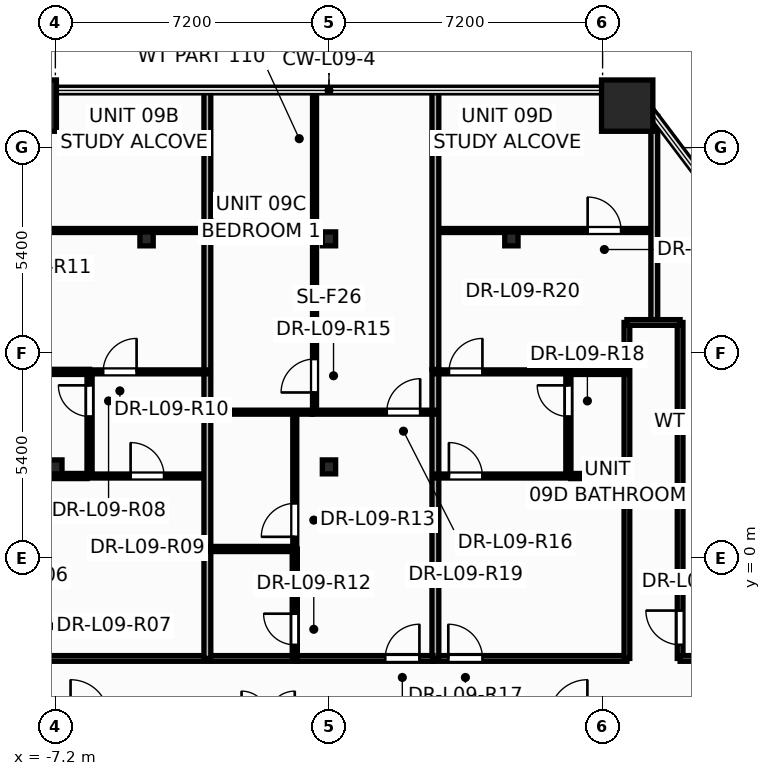
"""IFC4 building model, lengths in metres.
Left out: names, types, materials, properties, quantities, classifications, styles, units other than length and angle.
Written with IfcOpenShell. Run it as: python <this file> out.ifc"""

import sys

from ifc_helpers import new_model, si_unit, direction, frame, frame_2d, origin, origin_2d, place, context, subcontext, project, spatial, rectangle, hollow_rectangle, i_section, extrude, element, fill, save


model = new_model("IFC4")
c1 = context("Model", 3, precision=1e-05, world=origin(), true_north=direction((0.0, 1.0)))
c2 = subcontext(c1, "Body", "Model", "MODEL_VIEW")
j1 = project(units=[si_unit("LENGTHUNIT", "METRE"), si_unit("PLANEANGLEUNIT", "RADIAN")], contexts=[c1])
p1 = place(None, origin())
s1 = spatial("IfcSite", under=j1, at=p1, CompositionType="ELEMENT")
p2 = place(p1, origin())
s2 = spatial("IfcBuilding", under=s1, at=p2, CompositionType="ELEMENT")
p3 = place(p2, frame((0.0, 0.0, 38.7)))
s3 = spatial("IfcBuildingStorey", under=s2, at=p3, CompositionType="ELEMENT", Elevation=38.7)
for number, where, z_axis, x_axis in (
    (1, (7.847, 11.906, 0.0), (0.0, 0.0, 1.0), (1.0, 0.0, 0.0)),
    (2, (-7.847, 11.906, 0.0), (0.0, 0.0, 1.0), (1.0, 0.0, 0.0)),
):
    element("IfcColumn", number, at=place(p3, frame(where, z_axis=z_axis, x_axis=x_axis)), inside=s3, PredefinedType="COLUMN", context=c2, shape_type="SweptSolid", body=[
        extrude(hollow_rectangle(XDim=1.35, YDim=1.35, WallThickness=0.065, at=origin_2d()), origin(), (0.0, 0.0, 1.0), 3.6),
    ])
for number, where, z_axis, x_axis in (
    (3, (-7.2, 2.4, 0.0), (0.0, 0.0, 1.0), (1.0, 0.0, 0.0)),
    (4, (0.0, 2.4, 0.0), (0.0, 0.0, 1.0), (1.0, 0.0, 0.0)),
    (5, (7.2, 2.4, 0.0), (0.0, 0.0, 1.0), (1.0, 0.0, 0.0)),
    (6, (-4.8, 8.4, 0.0), (0.0, 0.0, 1.0), (1.0, 0.0, 0.0)),
    (7, (0.0, 8.4, 0.0), (0.0, 0.0, 1.0), (1.0, 0.0, 0.0)),
    (8, (4.8, 8.4, 0.0), (0.0, 0.0, 1.0), (1.0, 0.0, 0.0)),
):
    element("IfcColumn", number, at=place(p3, frame(where, z_axis=z_axis, x_axis=x_axis)), inside=s3, PredefinedType="COLUMN", context=c2, shape_type="SweptSolid", body=[
        extrude(i_section(OverallWidth=0.35, OverallDepth=0.367, WebThickness=0.025, FlangeThickness=0.032, at=origin_2d()), origin(), (0.0, 0.0, 1.0), 3.6),
    ])
p4 = place(p3, frame((9.24, -2.64, 0.0), z_axis=(0.0, 0.0, 1.0), x_axis=(0.0, 1.0, 0.0)))
e9 = element("IfcWall", 9, at=p4, inside=s3, PredefinedType="PARTITIONING", context=c2, shape_type="SweptSolid", body=[
    extrude(rectangle(XDim=8.84, YDim=0.15, at=frame_2d((4.42, 0.0))), origin(), (0.0, 0.0, 1.0), 2.509),
])
p5 = place(p4, frame((0.359, 0.0, 0.0)))
e10 = element("IfcOpeningElement", 10, at=p5, cuts=e9, PredefinedType="OPENING", context=c2, shape_type="SweptSolid", body=[
    extrude(rectangle(XDim=0.906, YDim=2.104, at=frame_2d((0.45, 1.052))), frame((0.0, 0.085, 0.0), z_axis=(0.0, -1.0, 0.0), x_axis=(1.0, 0.0, 0.0)), (0.0, 0.0, 1.0), 0.17),
])
p6 = place(p3, frame((-0.38, 3.84, 0.0), z_axis=(0.0, 0.0, 1.0), x_axis=(0.0, 1.0, 0.0)))
e11 = element("IfcWall", 11, at=p6, inside=s3, PredefinedType="PARTITIONING", context=c2, shape_type="SweptSolid", body=[
    extrude(rectangle(XDim=8.466, YDim=0.105, at=frame_2d((4.233, 0.0))), origin(), (0.0, 0.0, 1.0), 2.509),
])
p7 = place(p6, frame((0.518, 0.0, 0.0)))
e12 = element("IfcOpeningElement", 12, at=p7, cuts=e11, PredefinedType="OPENING", context=c2, shape_type="SweptSolid", body=[
    extrude(rectangle(XDim=0.886, YDim=2.104, at=frame_2d((0.44, 1.052))), frame((0.0, 0.062, 0.0), z_axis=(0.0, -1.0, 0.0), x_axis=(1.0, 0.0, 0.0)), (0.0, 0.0, 1.0), 0.125),
])
p8 = place(p3, frame((2.8, 8.62, 0.0), z_axis=(0.0, 0.0, 1.0), x_axis=(1.0, 0.0, 0.0)))
e13 = element("IfcWall", 13, at=p8, inside=s3, PredefinedType="PARTITIONING", context=c2, shape_type="SweptSolid", body=[
    extrude(rectangle(XDim=5.76, YDim=0.105, at=frame_2d((2.88, 0.0))), origin(), (0.0, 0.0, 1.0), 2.509),
])
p9 = place(p8, frame((4.007, 0.0, 0.0)))
e14 = element("IfcOpeningElement", 14, at=p9, cuts=e13, PredefinedType="OPENING", context=c2, shape_type="SweptSolid", body=[
    extrude(rectangle(XDim=0.886, YDim=2.104, at=frame_2d((0.44, 1.052))), frame((0.0, 0.062, 0.0), z_axis=(0.0, -1.0, 0.0), x_axis=(1.0, 0.0, 0.0)), (0.0, 0.0, 1.0), 0.125),
])
p10 = place(p3, frame((9.24, -2.64, 0.0), z_axis=(0.0, 0.0, 1.0), x_axis=(1.0, 0.0, 0.0)))
e15 = element("IfcWall", 15, at=p10, inside=s3, PredefinedType="PARTITIONING", context=c2, shape_type="SweptSolid", body=[
    extrude(rectangle(XDim=5.4, YDim=0.15, at=frame_2d((2.7, 0.0))), origin(), (0.0, 0.0, 1.0), 3.35),
])
p11 = place(p3, frame((-8.56, 8.62, 0.0), z_axis=(0.0, 0.0, 1.0), x_axis=(1.0, 0.0, 0.0)))
e16 = element("IfcWall", 16, at=p11, inside=s3, PredefinedType="PARTITIONING", context=c2, shape_type="SweptSolid", body=[
    extrude(rectangle(XDim=5.36, YDim=0.105, at=frame_2d((2.68, 0.0))), origin(), (0.0, 0.0, 1.0), 2.509),
])
p12 = place(p11, frame((0.358, 0.0, 0.0)))
e17 = element("IfcOpeningElement", 17, at=p12, cuts=e16, PredefinedType="OPENING", context=c2, shape_type="SweptSolid", body=[
    extrude(rectangle(XDim=0.886, YDim=2.104, at=frame_2d((0.44, 1.052))), frame((0.0, 0.062, 0.0), z_axis=(0.0, -1.0, 0.0), x_axis=(1.0, 0.0, 0.0)), (0.0, 0.0, 1.0), 0.125),
])
p13 = place(p3, frame((2.74, -2.64, 0.0), z_axis=(0.0, 0.0, 1.0), x_axis=(1.0, 0.0, 0.0)))
e18 = element("IfcWall", 18, at=p13, inside=s3, PredefinedType="PARTITIONING", context=c2, shape_type="SweptSolid", body=[
    extrude(rectangle(XDim=5.1, YDim=0.15, at=frame_2d((2.55, 0.0))), origin(), (0.0, 0.0, 1.0), 2.325),
])
p14 = place(p13, frame((0.4, 0.0, 0.0)))
e19 = element("IfcOpeningElement", 19, at=p14, cuts=e18, PredefinedType="OPENING", context=c2, shape_type="SweptSolid", body=[
    extrude(rectangle(XDim=0.906, YDim=2.104, at=frame_2d((0.45, 1.052))), frame((0.0, 0.085, 0.0), z_axis=(0.0, -1.0, 0.0), x_axis=(1.0, 0.0, 0.0)), (0.0, 0.0, 1.0), 0.17),
])
p15 = place(p3, frame((7.84, -2.64, 0.0), z_axis=(0.0, 0.0, 1.0), x_axis=(0.0, 1.0, 0.0)))
e20 = element("IfcWall", 20, at=p15, inside=s3, PredefinedType="PARTITIONING", context=c2, shape_type="SweptSolid", body=[
    extrude(rectangle(XDim=8.84, YDim=0.15, at=frame_2d((4.42, 0.0))), origin(), (0.0, 0.0, 1.0), 2.509),
])
p16 = place(p3, frame((2.8, -2.64, 0.0), z_axis=(0.0, 0.0, 1.0), x_axis=(0.0, 1.0, 0.0)))
e21 = element("IfcWall", 21, at=p16, inside=s3, PredefinedType="PARTITIONING", context=c2, shape_type="SweptSolid", body=[
    extrude(rectangle(XDim=7.6, YDim=0.18, at=frame_2d((3.8, 0.0))), origin(), (0.0, 0.0, 1.0), 2.325),
])
p17 = place(p3, frame((-7.84, -2.64, 0.0), z_axis=(0.0, 0.0, 1.0), x_axis=(1.0, 0.0, 0.0)))
e22 = element("IfcWall", 22, at=p17, inside=s3, PredefinedType="PARTITIONING", context=c2, shape_type="SweptSolid", body=[
    extrude(rectangle(XDim=7.0, YDim=0.15, at=frame_2d((3.5, 0.0))), origin(), (0.0, 0.0, 1.0), 2.325),
])
p18 = place(p3, frame((2.8, 4.962, 0.0), z_axis=(0.0, 0.0, 1.0), x_axis=(0.0, 1.0, 0.0)))
e23 = element("IfcWall", 23, at=p18, inside=s3, PredefinedType="PARTITIONING", context=c2, shape_type="SweptSolid", body=[
    extrude(rectangle(XDim=7.344, YDim=0.18, at=frame_2d((3.672, 0.0))), origin(), (0.0, 0.0, 1.0), 2.509),
])
p19 = place(p3, frame((-0.838, -2.64, 0.0), z_axis=(0.0, 0.0, 1.0), x_axis=(1.0, 0.0, 0.0)))
e24 = element("IfcWall", 24, at=p19, inside=s3, PredefinedType="PARTITIONING", context=c2, shape_type="SweptSolid", body=[
    extrude(rectangle(XDim=3.576, YDim=0.15, at=frame_2d((1.788, 0.0))), origin(), (0.0, 0.0, 1.0), 2.325),
])
p20 = place(p19, frame((2.318, 0.0, 0.0)))
e25 = element("IfcOpeningElement", 25, at=p20, cuts=e24, PredefinedType="OPENING", context=c2, shape_type="SweptSolid", body=[
    extrude(rectangle(XDim=0.906, YDim=2.104, at=frame_2d((0.45, 1.052))), frame((0.0, 0.085, 0.0), z_axis=(0.0, -1.0, 0.0), x_axis=(1.0, 0.0, 0.0)), (0.0, 0.0, 1.0), 0.17),
])
p21 = place(p3, frame((-3.2, 3.8, 0.0), z_axis=(0.0, 0.0, 1.0), x_axis=(0.0, 1.0, 0.0)))
e26 = element("IfcWall", 26, at=p21, inside=s3, PredefinedType="PARTITIONING", context=c2, shape_type="SweptSolid", body=[
    extrude(rectangle(XDim=8.506, YDim=0.18, at=frame_2d((4.253, 0.0))), origin(), (0.0, 0.0, 1.0), 2.509),
])
p22 = place(p3, frame((-0.9, 0.24, 0.0), z_axis=(0.0, 0.0, 1.0), x_axis=(0.0, 1.0, 0.0)))
e27 = element("IfcWall", 27, at=p22, inside=s3, PredefinedType="PARTITIONING", context=c2, shape_type="SweptSolid", body=[
    extrude(rectangle(XDim=3.6, YDim=0.105, at=frame_2d((1.8, 0.0))), origin(), (0.0, 0.0, 1.0), 2.325),
])
p23 = place(p22, frame((0.32, 0.0, 0.0)))
e28 = element("IfcOpeningElement", 28, at=p23, cuts=e27, PredefinedType="OPENING", context=c2, shape_type="SweptSolid", body=[
    extrude(rectangle(XDim=0.886, YDim=2.104, at=frame_2d((0.44, 1.052))), frame((0.0, 0.062, 0.0), z_axis=(0.0, -1.0, 0.0), x_axis=(1.0, 0.0, 0.0)), (0.0, 0.0, 1.0), 0.125),
])
p24 = place(p3, frame((2.8, 2.16, 0.0), z_axis=(0.0, 0.0, 1.0), x_axis=(1.0, 0.0, 0.0)))
e29 = element("IfcWall", 29, at=p24, inside=s3, PredefinedType="PARTITIONING", context=c2, shape_type="SweptSolid", body=[
    extrude(rectangle(XDim=3.56, YDim=0.105, at=frame_2d((1.78, 0.0))), origin(), (0.0, 0.0, 1.0), 2.325),
])
p25 = place(p24, frame((0.356, 0.0, 0.0)))
e30 = element("IfcOpeningElement", 30, at=p25, cuts=e29, PredefinedType="OPENING", context=c2, shape_type="SweptSolid", body=[
    extrude(rectangle(XDim=0.886, YDim=2.104, at=frame_2d((0.44, 1.052))), frame((0.0, 0.062, 0.0), z_axis=(0.0, -1.0, 0.0), x_axis=(1.0, 0.0, 0.0)), (0.0, 0.0, 1.0), 0.125),
])
p26 = place(p3, frame((2.8, 4.9, 0.0), z_axis=(0.0, 0.0, 1.0), x_axis=(1.0, 0.0, 0.0)))
e31 = element("IfcWall", 31, at=p26, inside=s3, PredefinedType="PARTITIONING", context=c2, shape_type="SweptSolid", body=[
    extrude(rectangle(XDim=3.5, YDim=0.105, at=frame_2d((1.75, 0.0))), origin(), (0.0, 0.0, 1.0), 2.509),
])
p27 = place(p26, frame((0.358, 0.0, 0.0)))
e32 = element("IfcOpeningElement", 32, at=p27, cuts=e31, PredefinedType="OPENING", context=c2, shape_type="SweptSolid", body=[
    extrude(rectangle(XDim=0.886, YDim=2.104, at=frame_2d((0.44, 1.052))), frame((0.0, 0.062, 0.0), z_axis=(0.0, -1.0, 0.0), x_axis=(1.0, 0.0, 0.0)), (0.0, 0.0, 1.0), 0.125),
])
p28 = place(p3, frame((-0.44, 3.84, 0.0), z_axis=(0.0, 0.0, 1.0), x_axis=(1.0, 0.0, 0.0)))
e33 = element("IfcWall", 33, at=p28, inside=s3, PredefinedType="PARTITIONING", context=c2, shape_type="SweptSolid", body=[
    extrude(rectangle(XDim=3.24, YDim=0.105, at=frame_2d((1.62, 0.0))), origin(), (0.0, 0.0, 1.0), 2.325),
])
p29 = place(p28, frame((1.96, 0.0, 0.0)))
e34 = element("IfcOpeningElement", 34, at=p29, cuts=e33, PredefinedType="OPENING", context=c2, shape_type="SweptSolid", body=[
    extrude(rectangle(XDim=0.886, YDim=2.104, at=frame_2d((0.44, 1.052))), frame((0.0, 0.062, 0.0), z_axis=(0.0, -1.0, 0.0), x_axis=(1.0, 0.0, 0.0)), (0.0, 0.0, 1.0), 0.125),
])
p30 = place(p3, frame((-6.36, 2.16, 0.0), z_axis=(0.0, 0.0, 1.0), x_axis=(1.0, 0.0, 0.0)))
e35 = element("IfcWall", 35, at=p30, inside=s3, PredefinedType="PARTITIONING", context=c2, shape_type="SweptSolid", body=[
    extrude(rectangle(XDim=3.16, YDim=0.105, at=frame_2d((1.58, 0.0))), origin(), (0.0, 0.0, 1.0), 2.325),
])
p31 = place(p30, frame((1.14, 0.0, 0.0)))
e36 = element("IfcOpeningElement", 36, at=p31, cuts=e35, PredefinedType="OPENING", context=c2, shape_type="SweptSolid", body=[
    extrude(rectangle(XDim=0.886, YDim=2.104, at=frame_2d((0.44, 1.052))), frame((0.0, 0.062, 0.0), z_axis=(0.0, -1.0, 0.0), x_axis=(1.0, 0.0, 0.0)), (0.0, 0.0, 1.0), 0.125),
])
p32 = place(p3, frame((-6.3, 4.9, 0.0), z_axis=(0.0, 0.0, 1.0), x_axis=(1.0, 0.0, 0.0)))
e37 = element("IfcWall", 37, at=p32, inside=s3, PredefinedType="PARTITIONING", context=c2, shape_type="SweptSolid", body=[
    extrude(rectangle(XDim=3.1, YDim=0.105, at=frame_2d((1.55, 0.0))), origin(), (0.0, 0.0, 1.0), 2.509),
])
p33 = place(p32, frame((0.358, 0.0, 0.0)))
e38 = element("IfcOpeningElement", 38, at=p33, cuts=e37, PredefinedType="OPENING", context=c2, shape_type="SweptSolid", body=[
    extrude(rectangle(XDim=0.886, YDim=2.104, at=frame_2d((0.44, 1.052))), frame((0.0, 0.062, 0.0), z_axis=(0.0, -1.0, 0.0), x_axis=(1.0, 0.0, 0.0)), (0.0, 0.0, 1.0), 0.125),
])
p34 = place(p3, frame((8.56, 6.2, 0.0), z_axis=(0.0, 0.0, 1.0), x_axis=(0.0, 1.0, 0.0)))
e39 = element("IfcWall", 39, at=p34, inside=s3, PredefinedType="PARTITIONING", context=c2, shape_type="SweptSolid", body=[
    extrude(rectangle(XDim=5.425, YDim=0.18, at=frame_2d((2.712, 0.0))), origin(), (0.0, 0.0, 1.0), 2.509),
])
p35 = place(p3, frame((-3.2, -2.64, 0.0), z_axis=(0.0, 0.0, 1.0), x_axis=(0.0, 1.0, 0.0)))
e40 = element("IfcWall", 40, at=p35, inside=s3, PredefinedType="PARTITIONING", context=c2, shape_type="SweptSolid", body=[
    extrude(rectangle(XDim=6.438, YDim=0.18, at=frame_2d((3.219, 0.0))), origin(), (0.0, 0.0, 1.0), 2.325),
])
p36 = place(p3, frame((-0.9, -2.64, 0.0), z_axis=(0.0, 0.0, 1.0), x_axis=(0.0, 1.0, 0.0)))
e41 = element("IfcWall", 41, at=p36, inside=s3, PredefinedType="PARTITIONING", context=c2, shape_type="SweptSolid", body=[
    extrude(rectangle(XDim=2.88, YDim=0.135, at=frame_2d((1.44, 0.0))), origin(), (0.0, 0.0, 1.0), 3.35),
])
p37 = place(p36, frame((0.357, 0.0, 0.0)))
e42 = element("IfcOpeningElement", 42, at=p37, cuts=e41, PredefinedType="OPENING", context=c2, shape_type="SweptSolid", body=[
    extrude(rectangle(XDim=0.826, YDim=2.104, at=frame_2d((0.41, 1.052))), frame((0.0, 0.078, 0.0), z_axis=(0.0, -1.0, 0.0), x_axis=(1.0, 0.0, 0.0)), (0.0, 0.0, 1.0), 0.155),
])
p38 = place(p3, frame((-6.3, 2.16, 0.0), z_axis=(0.0, 0.0, 1.0), x_axis=(0.0, 1.0, 0.0)))
e43 = element("IfcWall", 43, at=p38, inside=s3, PredefinedType="PARTITIONING", context=c2, shape_type="SweptSolid", body=[
    extrude(rectangle(XDim=2.74, YDim=0.135, at=frame_2d((1.37, 0.0))), origin(), (0.0, 0.0, 1.0), 2.325),
])
p39 = place(p38, frame((1.566, 0.0, 0.0)))
e44 = element("IfcOpeningElement", 44, at=p39, cuts=e43, PredefinedType="OPENING", context=c2, shape_type="SweptSolid", body=[
    extrude(rectangle(XDim=0.826, YDim=2.104, at=frame_2d((0.41, 1.052))), frame((0.0, 0.078, 0.0), z_axis=(0.0, -1.0, 0.0), x_axis=(1.0, 0.0, 0.0)), (0.0, 0.0, 1.0), 0.155),
])
p40 = place(p3, frame((6.3, 2.16, 0.0), z_axis=(0.0, 0.0, 1.0), x_axis=(0.0, 1.0, 0.0)))
e45 = element("IfcWall", 45, at=p40, inside=s3, PredefinedType="PARTITIONING", context=c2, shape_type="SweptSolid", body=[
    extrude(rectangle(XDim=2.74, YDim=0.135, at=frame_2d((1.37, 0.0))), origin(), (0.0, 0.0, 1.0), 2.325),
])
p41 = place(p40, frame((1.566, 0.0, 0.0)))
e46 = element("IfcOpeningElement", 46, at=p41, cuts=e45, PredefinedType="OPENING", context=c2, shape_type="SweptSolid", body=[
    extrude(rectangle(XDim=0.826, YDim=2.104, at=frame_2d((0.41, 1.052))), frame((0.0, 0.078, 0.0), z_axis=(0.0, -1.0, 0.0), x_axis=(1.0, 0.0, 0.0)), (0.0, 0.0, 1.0), 0.155),
])
p42 = place(p3, frame((-3.2, 0.24, 0.0), z_axis=(0.0, 0.0, 1.0), x_axis=(1.0, 0.0, 0.0)))
e47 = element("IfcWall", 47, at=p42, inside=s3, PredefinedType="PARTITIONING", context=c2, shape_type="SweptSolid", body=[
    extrude(rectangle(XDim=2.3, YDim=0.135, at=frame_2d((1.15, 0.0))), origin(), (0.0, 0.0, 1.0), 3.35),
])
p43 = place(p3, frame((-3.2, 3.84, 0.0), z_axis=(0.0, 0.0, 1.0), x_axis=(1.0, 0.0, 0.0)))
e48 = element("IfcWall", 48, at=p43, inside=s3, PredefinedType="PARTITIONING", context=c2, shape_type="SweptSolid", body=[
    extrude(rectangle(XDim=2.758, YDim=0.105, at=frame_2d((1.379, 0.0))), origin(), (0.0, 0.0, 1.0), 2.919),
])
for number, where, z_axis, x_axis in (
    (49, (-7.84, 2.16, 0.0), (0.0, 0.0, 1.0), (1.0, 0.0, 0.0)),
    (50, (6.362, 2.16, 0.0), (0.0, 0.0, 1.0), (1.0, 0.0, 0.0)),
):
    element("IfcWall", number, at=place(p3, frame(where, z_axis=z_axis, x_axis=x_axis)), inside=s3, PredefinedType="PARTITIONING", context=c2, shape_type="SweptSolid", body=[
        extrude(rectangle(XDim=1.478, YDim=0.135, at=frame_2d((0.739, 0.0))), origin(), (0.0, 0.0, 1.0), 2.325),
    ])
for number, where, z_axis, x_axis in (
    (51, (-7.84, 4.9, 0.0), (0.0, 0.0, 1.0), (1.0, 0.0, 0.0)),
    (52, (6.3, 4.9, 0.0), (0.0, 0.0, 1.0), (1.0, 0.0, 0.0)),
):
    element("IfcWall", number, at=place(p3, frame(where, z_axis=z_axis, x_axis=x_axis)), inside=s3, PredefinedType="PARTITIONING", context=c2, shape_type="SweptSolid", body=[
        extrude(rectangle(XDim=1.54, YDim=0.135, at=frame_2d((0.77, 0.0))), origin(), (0.0, 0.0, 1.0), 2.509),
    ])
p44 = place(p3, frame((7.84, 6.2, 0.0), z_axis=(0.0, 0.0, 1.0), x_axis=(1.0, 0.0, 0.0)))
e53 = element("IfcWall", 53, at=p44, inside=s3, PredefinedType="PARTITIONING", context=c2, shape_type="SweptSolid", body=[
    extrude(rectangle(XDim=1.4, YDim=0.15, at=frame_2d((0.7, 0.0))), origin(), (0.0, 0.0, 1.0), 3.35),
])
p45 = place(p39, origin())
e54 = element("IfcDoor", 54, at=p45, inside=s3, OperationType="SINGLE_SWING_RIGHT", PredefinedType="DOOR", context=c2, shape_type="SweptSolid", body=[
    extrude(rectangle(XDim=0.82, YDim=2.1, at=frame_2d((0.41, 1.05))), frame((0.0, 0.025, 0.0), z_axis=(0.0, -1.0, 0.0), x_axis=(1.0, 0.0, 0.0)), (0.0, 0.0, 1.0), 0.05),
])
fill(e44, e54)
p46 = place(p31, origin())
e55 = element("IfcDoor", 55, at=p46, inside=s3, OperationType="SINGLE_SWING_LEFT", PredefinedType="DOOR", context=c2, shape_type="SweptSolid", body=[
    extrude(rectangle(XDim=0.88, YDim=2.1, at=frame_2d((0.44, 1.05))), frame((0.0, 0.025, 0.0), z_axis=(0.0, -1.0, 0.0), x_axis=(1.0, 0.0, 0.0)), (0.0, 0.0, 1.0), 0.05),
])
fill(e36, e55)
p47 = place(p33, origin())
e56 = element("IfcDoor", 56, at=p47, inside=s3, OperationType="SINGLE_SWING_RIGHT", PredefinedType="DOOR", context=c2, shape_type="SweptSolid", body=[
    extrude(rectangle(XDim=0.88, YDim=2.1, at=frame_2d((0.44, 1.05))), frame((0.0, 0.025, 0.0), z_axis=(0.0, -1.0, 0.0), x_axis=(1.0, 0.0, 0.0)), (0.0, 0.0, 1.0), 0.05),
])
fill(e38, e56)
p48 = place(p37, origin())
e57 = element("IfcDoor", 57, at=p48, inside=s3, OperationType="SINGLE_SWING_RIGHT", PredefinedType="DOOR", context=c2, shape_type="SweptSolid", body=[
    extrude(rectangle(XDim=0.82, YDim=2.1, at=frame_2d((0.41, 1.05))), frame((0.0, 0.025, 0.0), z_axis=(0.0, -1.0, 0.0), x_axis=(1.0, 0.0, 0.0)), (0.0, 0.0, 1.0), 0.05),
])
fill(e42, e57)
p49 = place(p23, origin())
e58 = element("IfcDoor", 58, at=p49, inside=s3, OperationType="SINGLE_SWING_LEFT", PredefinedType="DOOR", context=c2, shape_type="SweptSolid", body=[
    extrude(rectangle(XDim=0.88, YDim=2.1, at=frame_2d((0.44, 1.05))), frame((0.0, 0.025, 0.0), z_axis=(0.0, -1.0, 0.0), x_axis=(1.0, 0.0, 0.0)), (0.0, 0.0, 1.0), 0.05),
])
fill(e28, e58)
p50 = place(p20, origin())
e59 = element("IfcDoor", 59, at=p50, inside=s3, OperationType="SINGLE_SWING_RIGHT", PredefinedType="DOOR", context=c2, shape_type="SweptSolid", body=[
    extrude(rectangle(XDim=0.9, YDim=2.1, at=frame_2d((0.45, 1.05))), frame((0.0, 0.025, 0.0), z_axis=(0.0, -1.0, 0.0), x_axis=(1.0, 0.0, 0.0)), (0.0, 0.0, 1.0), 0.05),
])
fill(e25, e59)
p51 = place(p7, origin())
e60 = element("IfcDoor", 60, at=p51, inside=s3, OperationType="SINGLE_SWING_LEFT", PredefinedType="DOOR", context=c2, shape_type="SweptSolid", body=[
    extrude(rectangle(XDim=0.88, YDim=2.1, at=frame_2d((0.44, 1.05))), frame((0.0, 0.025, 0.0), z_axis=(0.0, -1.0, 0.0), x_axis=(1.0, 0.0, 0.0)), (0.0, 0.0, 1.0), 0.05),
])
fill(e12, e60)
p52 = place(p29, origin())
e61 = element("IfcDoor", 61, at=p52, inside=s3, OperationType="SINGLE_SWING_RIGHT", PredefinedType="DOOR", context=c2, shape_type="SweptSolid", body=[
    extrude(rectangle(XDim=0.88, YDim=2.1, at=frame_2d((0.44, 1.05))), frame((0.0, 0.025, 0.0), z_axis=(0.0, -1.0, 0.0), x_axis=(1.0, 0.0, 0.0)), (0.0, 0.0, 1.0), 0.05),
])
fill(e34, e61)
p53 = place(p14, origin())
e62 = element("IfcDoor", 62, at=p53, inside=s3, OperationType="SINGLE_SWING_LEFT", PredefinedType="DOOR", context=c2, shape_type="SweptSolid", body=[
    extrude(rectangle(XDim=0.9, YDim=2.1, at=frame_2d((0.45, 1.05))), frame((0.0, 0.025, 0.0), z_axis=(0.0, -1.0, 0.0), x_axis=(1.0, 0.0, 0.0)), (0.0, 0.0, 1.0), 0.05),
])
fill(e19, e62)
p54 = place(p41, origin())
e63 = element("IfcDoor", 63, at=p54, inside=s3, OperationType="SINGLE_SWING_RIGHT", PredefinedType="DOOR", context=c2, shape_type="SweptSolid", body=[
    extrude(rectangle(XDim=0.82, YDim=2.1, at=frame_2d((0.41, 1.05))), frame((0.0, 0.025, 0.0), z_axis=(0.0, -1.0, 0.0), x_axis=(1.0, 0.0, 0.0)), (0.0, 0.0, 1.0), 0.05),
])
fill(e46, e63)
p55 = place(p25, origin())
e64 = element("IfcDoor", 64, at=p55, inside=s3, OperationType="SINGLE_SWING_LEFT", PredefinedType="DOOR", context=c2, shape_type="SweptSolid", body=[
    extrude(rectangle(XDim=0.88, YDim=2.1, at=frame_2d((0.44, 1.05))), frame((0.0, 0.025, 0.0), z_axis=(0.0, -1.0, 0.0), x_axis=(1.0, 0.0, 0.0)), (0.0, 0.0, 1.0), 0.05),
])
fill(e30, e64)
p56 = place(p27, origin())
e65 = element("IfcDoor", 65, at=p56, inside=s3, OperationType="SINGLE_SWING_RIGHT", PredefinedType="DOOR", context=c2, shape_type="SweptSolid", body=[
    extrude(rectangle(XDim=0.88, YDim=2.1, at=frame_2d((0.44, 1.05))), frame((0.0, 0.025, 0.0), z_axis=(0.0, -1.0, 0.0), x_axis=(1.0, 0.0, 0.0)), (0.0, 0.0, 1.0), 0.05),
])
fill(e32, e65)
p57 = place(p9, origin())
e66 = element("IfcDoor", 66, at=p57, inside=s3, OperationType="SINGLE_SWING_LEFT", PredefinedType="DOOR", context=c2, shape_type="SweptSolid", body=[
    extrude(rectangle(XDim=0.88, YDim=2.1, at=frame_2d((0.44, 1.05))), frame((0.0, 0.025, 0.0), z_axis=(0.0, -1.0, 0.0), x_axis=(1.0, 0.0, 0.0)), (0.0, 0.0, 1.0), 0.05),
])
fill(e14, e66)
p58 = place(p5, origin())
e67 = element("IfcDoor", 67, at=p58, inside=s3, OperationType="SINGLE_SWING_RIGHT", PredefinedType="DOOR", context=c2, shape_type="SweptSolid", body=[
    extrude(rectangle(XDim=0.9, YDim=2.1, at=frame_2d((0.45, 1.05))), frame((0.0, 0.025, 0.0), z_axis=(0.0, -1.0, 0.0), x_axis=(1.0, 0.0, 0.0)), (0.0, 0.0, 1.0), 0.05),
])
fill(e10, e67)
save(model, sys.argv[1])
